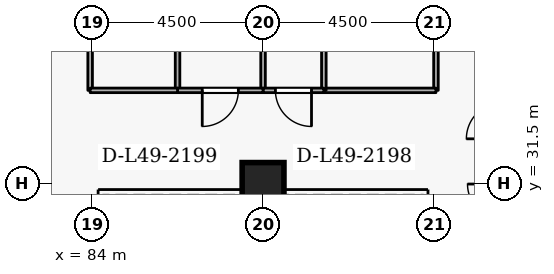
"""IFC4 building model, lengths in metres.
Left out: names, types, materials, properties, quantities, classifications, styles, units other than length and angle.
Written with IfcOpenShell. Run it as: python <this file> out.ifc"""

import sys

from ifc_helpers import new_model, si_unit, direction, frame, frame_2d, origin, origin_2d, place, context, subcontext, project, spatial, rectangle, extrude, element, fill, save


model = new_model("IFC4")
c1 = context("Model", 3, precision=1e-05, world=origin(), true_north=direction((0.0, 1.0)))
c2 = subcontext(c1, "Body", "Model", "MODEL_VIEW")
j1 = project(units=[si_unit("LENGTHUNIT", "METRE"), si_unit("PLANEANGLEUNIT", "RADIAN")], contexts=[c1])
p1 = place(None, origin())
s1 = spatial("IfcSite", under=j1, at=p1, CompositionType="ELEMENT")
p2 = place(p1, origin())
s2 = spatial("IfcBuilding", under=s1, at=p2, CompositionType="ELEMENT")
p3 = place(p2, frame((0.0, 0.0, 185.7)))
s3 = spatial("IfcBuildingStorey", under=s2, at=p3, CompositionType="ELEMENT", Elevation=185.7)
p4 = place(p3, frame((88.5, 31.5, 0.0), z_axis=(0.0, 0.0, 1.0), x_axis=(1.0, 0.0, 0.0)))
e1 = element("IfcColumn", 1, at=p4, inside=s3, PredefinedType="COLUMN", context=c2, shape_type="SweptSolid", body=[
    extrude(rectangle(XDim=1.1, YDim=1.1, at=origin_2d()), origin(), (0.0, 0.0, 1.0), 3.6),
])
p5 = place(p3, frame((93.05, 39.25, 0.0), z_axis=(0.0, 0.0, 1.0), x_axis=(0.0, -1.0, 0.0)))
e2 = element("IfcWall", 2, at=p5, inside=s3, PredefinedType="PARTITIONING", context=c2, shape_type="SweptSolid", body=[
    extrude(rectangle(XDim=5.3, YDim=0.12, at=frame_2d((2.65, 0.0))), origin(), (0.0, 0.0, 1.0), 3.34),
])
p6 = place(p5, frame((2.125, 0.0, 0.0)))
e3 = element("IfcOpeningElement", 3, at=p6, cuts=e2, PredefinedType="OPENING", context=c2, shape_type="SweptSolid", body=[
    extrude(rectangle(XDim=1.05, YDim=2.1, at=frame_2d((0.525, 1.05))), frame((0.0, 0.07, 0.0), z_axis=(0.0, -1.0, 0.0), x_axis=(1.0, 0.0, 0.0)), (0.0, 0.0, 1.0), 0.14),
])
p7 = place(p3, frame((93.05, 33.95, 0.0), z_axis=(0.0, 0.0, 1.0), x_axis=(-1.0, 0.0, 0.0)))
e4 = element("IfcWall", 4, at=p7, inside=s3, PredefinedType="PARTITIONING", context=c2, shape_type="SweptSolid", body=[
    extrude(rectangle(XDim=2.95, YDim=0.12, at=frame_2d((1.475, 0.0))), origin(), (0.0, 0.0, 1.0), 3.34),
])
p8 = place(p3, frame((90.1, 33.95, 0.0), z_axis=(0.0, 0.0, 1.0), x_axis=(0.0, 1.0, 0.0)))
e5 = element("IfcWall", 5, at=p8, inside=s3, PredefinedType="PARTITIONING", context=c2, shape_type="SweptSolid", body=[
    extrude(rectangle(XDim=16.77, YDim=0.12, at=frame_2d((8.385, 0.0))), origin(), (0.0, 0.0, 1.0), 3.34),
])
p9 = place(p3, frame((88.5, 33.95, 0.0), z_axis=(0.0, 0.0, 1.0), x_axis=(0.0, 1.0, 0.0)))
e6 = element("IfcWall", 6, at=p9, inside=s3, PredefinedType="PARTITIONING", context=c2, shape_type="SweptSolid", body=[
    extrude(rectangle(XDim=16.77, YDim=0.12, at=frame_2d((8.385, 0.0))), origin(), (0.0, 0.0, 1.0), 2.878),
])
p10 = place(p3, frame((90.1, 33.95, 0.0), z_axis=(0.0, 0.0, 1.0), x_axis=(-1.0, 0.0, 0.0)))
e7 = element("IfcWall", 7, at=p10, inside=s3, PredefinedType="PARTITIONING", context=c2, shape_type="SweptSolid", body=[
    extrude(rectangle(XDim=1.6, YDim=0.12, at=frame_2d((0.8, 0.0))), origin(), (0.0, 0.0, 1.0), 3.34),
])
p11 = place(p10, frame((0.325, 0.0, 0.0)))
e8 = element("IfcOpeningElement", 8, at=p11, cuts=e7, PredefinedType="OPENING", context=c2, shape_type="SweptSolid", body=[
    extrude(rectangle(XDim=0.95, YDim=2.1, at=frame_2d((0.475, 1.05))), frame((0.0, 0.07, 0.0), z_axis=(0.0, -1.0, 0.0), x_axis=(1.0, 0.0, 0.0)), (0.0, 0.0, 1.0), 0.14),
])
p12 = place(p3, frame((86.25, 33.95, 0.0), z_axis=(0.0, 0.0, 1.0), x_axis=(0.0, 1.0, 0.0)))
e9 = element("IfcWall", 9, at=p12, inside=s3, PredefinedType="PARTITIONING", context=c2, shape_type="SweptSolid", body=[
    extrude(rectangle(XDim=16.77, YDim=0.12, at=frame_2d((8.385, 0.0))), origin(), (0.0, 0.0, 1.0), 3.34),
])
p13 = place(p3, frame((88.5, 33.95, 0.0), z_axis=(0.0, 0.0, 1.0), x_axis=(-1.0, 0.0, 0.0)))
e10 = element("IfcWall", 10, at=p13, inside=s3, PredefinedType="PARTITIONING", context=c2, shape_type="SweptSolid", body=[
    extrude(rectangle(XDim=2.25, YDim=0.12, at=frame_2d((1.125, 0.0))), origin(), (0.0, 0.0, 1.0), 3.34),
])
p14 = place(p13, frame((0.65, 0.0, 0.0)))
e11 = element("IfcOpeningElement", 11, at=p14, cuts=e10, PredefinedType="OPENING", context=c2, shape_type="SweptSolid", body=[
    extrude(rectangle(XDim=0.95, YDim=2.1, at=frame_2d((0.475, 1.05))), frame((0.0, 0.07, 0.0), z_axis=(0.0, -1.0, 0.0), x_axis=(1.0, 0.0, 0.0)), (0.0, 0.0, 1.0), 0.14),
])
p15 = place(p3, frame((83.95, 33.95, 0.0), z_axis=(0.0, 0.0, 1.0), x_axis=(0.0, 1.0, 0.0)))
e12 = element("IfcWall", 12, at=p15, inside=s3, PredefinedType="PARTITIONING", context=c2, shape_type="SweptSolid", body=[
    extrude(rectangle(XDim=3.35, YDim=0.12, at=frame_2d((1.675, 0.0))), origin(), (0.0, 0.0, 1.0), 3.34),
])
p16 = place(p15, frame((1.15, 0.0, 0.0)))
e13 = element("IfcOpeningElement", 13, at=p16, cuts=e12, PredefinedType="OPENING", context=c2, shape_type="SweptSolid", body=[
    extrude(rectangle(XDim=1.05, YDim=2.1, at=frame_2d((0.525, 1.05))), frame((0.0, 0.07, 0.0), z_axis=(0.0, -1.0, 0.0), x_axis=(1.0, 0.0, 0.0)), (0.0, 0.0, 1.0), 0.14),
])
p17 = place(p3, frame((86.25, 33.95, 0.0), z_axis=(0.0, 0.0, 1.0), x_axis=(-1.0, 0.0, 0.0)))
e14 = element("IfcWall", 14, at=p17, inside=s3, PredefinedType="PARTITIONING", context=c2, shape_type="SweptSolid", body=[
    extrude(rectangle(XDim=2.3, YDim=0.12, at=frame_2d((1.15, 0.0))), origin(), (0.0, 0.0, 1.0), 3.34),
])
p18 = place(p11, origin())
e15 = element("IfcDoor", 15, at=p18, inside=s3, OperationType="SINGLE_SWING_LEFT", PredefinedType="DOOR", context=c2, shape_type="SweptSolid", body=[
    extrude(rectangle(XDim=0.95, YDim=2.1, at=frame_2d((0.475, 1.05))), frame((0.0, 0.025, 0.0), z_axis=(0.0, -1.0, 0.0), x_axis=(1.0, 0.0, 0.0)), (0.0, 0.0, 1.0), 0.05),
])
fill(e8, e15)
p19 = place(p14, origin())
e16 = element("IfcDoor", 16, at=p19, inside=s3, OperationType="SINGLE_SWING_RIGHT", PredefinedType="DOOR", context=c2, shape_type="SweptSolid", body=[
    extrude(rectangle(XDim=0.95, YDim=2.1, at=frame_2d((0.475, 1.05))), frame((0.0, 0.025, 0.0), z_axis=(0.0, -1.0, 0.0), x_axis=(1.0, 0.0, 0.0)), (0.0, 0.0, 1.0), 0.05),
])
fill(e11, e16)
save(model, sys.argv[1])
